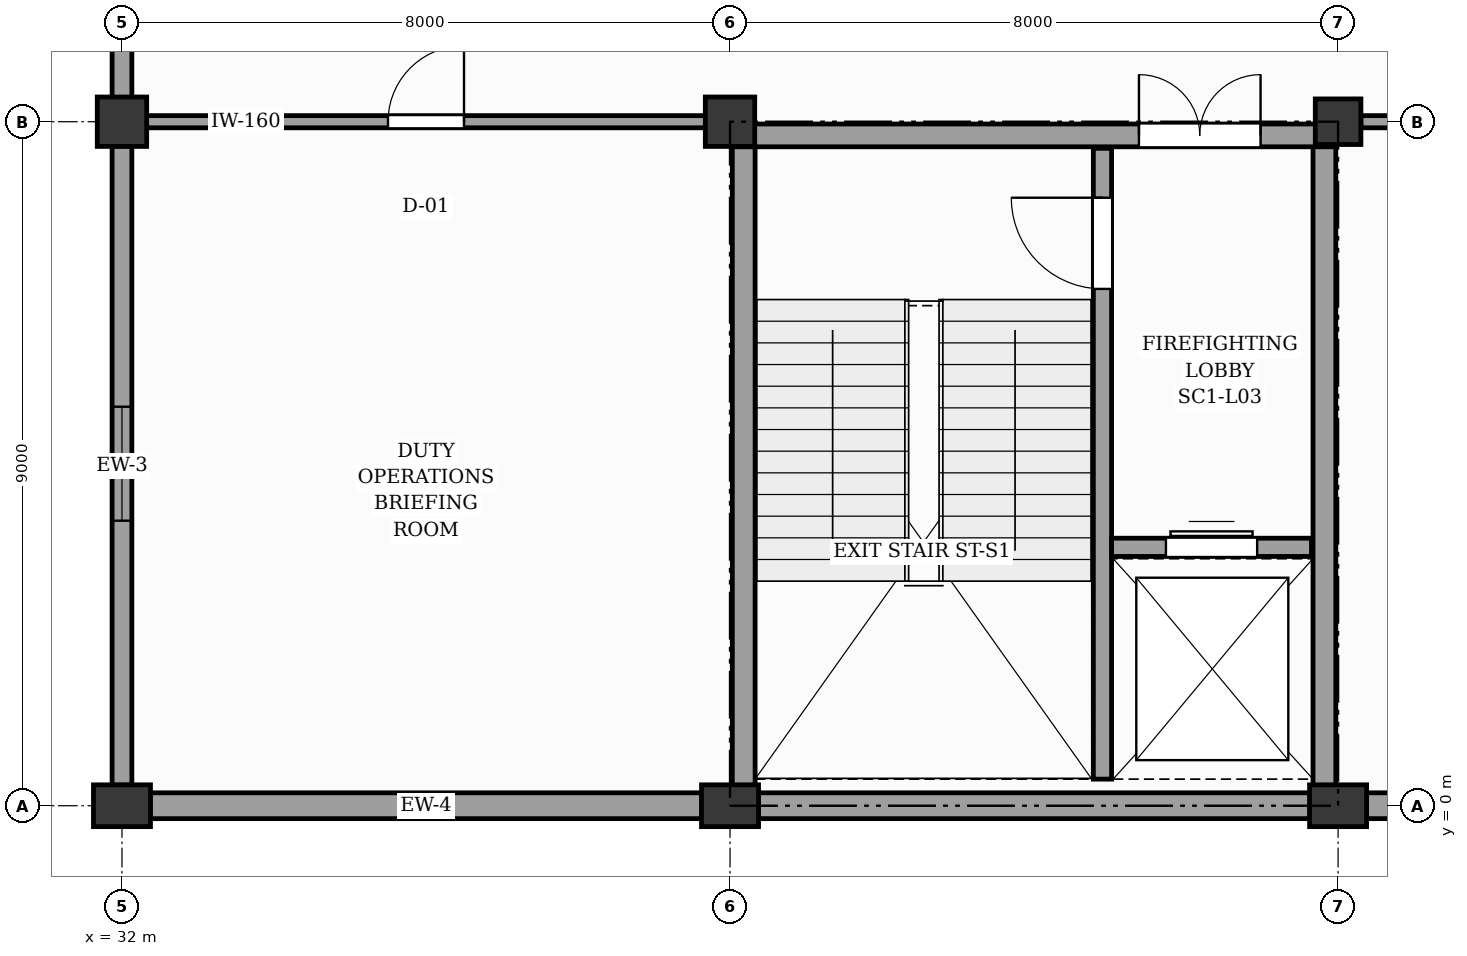
"""IFC4 building model, lengths in metres.
Left out: names, types, materials, properties, quantities, classifications, styles, units other than length and angle.
Written with IfcOpenShell. Run it as: python <this file> out.ifc"""

import sys

from ifc_helpers import new_model, si_unit, direction, frame, frame_2d, origin, origin_2d, place, context, subcontext, project, spatial, rectangle, extrude, element, fill, save


model = new_model("IFC4")
c1 = context("Model", 3, precision=1e-05, world=origin(), true_north=direction((0.0, 1.0)))
c2 = subcontext(c1, "Body", "Model", "MODEL_VIEW")
j1 = project(units=[si_unit("LENGTHUNIT", "METRE"), si_unit("PLANEANGLEUNIT", "RADIAN")], contexts=[c1])
p1 = place(None, origin())
s1 = spatial("IfcSite", under=j1, at=p1, CompositionType="ELEMENT")
p2 = place(p1, origin())
s2 = spatial("IfcBuilding", under=s1, at=p2, CompositionType="ELEMENT")
p3 = place(p2, frame((0.0, 0.0, 16.2)))
s3 = spatial("IfcBuildingStorey", under=s2, at=p3, CompositionType="ELEMENT", Elevation=16.2)
p4 = place(p3, frame((32.0, 0.0, 0.0), z_axis=(0.0, 0.0, 1.0), x_axis=(1.0, 0.0, 0.0)))
e1 = element("IfcColumn", 1, at=p4, inside=s3, PredefinedType="PILASTER", context=c2, shape_type="SweptSolid", body=[
    extrude(rectangle(XDim=0.75, YDim=0.55, at=origin_2d()), origin(), (0.0, 0.0, 1.0), 4.2),
])
p5 = place(p3, frame((32.0, 9.0, 0.0), z_axis=(0.0, 0.0, 1.0), x_axis=(1.0, 0.0, 0.0)))
e2 = element("IfcColumn", 2, at=p5, inside=s3, PredefinedType="COLUMN", context=c2, shape_type="SweptSolid", body=[
    extrude(rectangle(XDim=0.65, YDim=0.65, at=origin_2d()), origin(), (0.0, 0.0, 1.0), 4.2),
])
p6 = place(p3, frame((40.0, 0.0, 0.0), z_axis=(0.0, 0.0, 1.0), x_axis=(1.0, 0.0, 0.0)))
e3 = element("IfcColumn", 3, at=p6, inside=s3, PredefinedType="PILASTER", context=c2, shape_type="SweptSolid", body=[
    extrude(rectangle(XDim=0.75, YDim=0.55, at=origin_2d()), origin(), (0.0, 0.0, 1.0), 4.2),
])
p7 = place(p3, frame((40.0, 9.0, 0.0), z_axis=(0.0, 0.0, 1.0), x_axis=(1.0, 0.0, 0.0)))
e4 = element("IfcColumn", 4, at=p7, inside=s3, PredefinedType="COLUMN", context=c2, shape_type="SweptSolid", body=[
    extrude(rectangle(XDim=0.65, YDim=0.65, at=origin_2d()), origin(), (0.0, 0.0, 1.0), 4.2),
])
p8 = place(p3, frame((48.0, 0.0, 0.0), z_axis=(0.0, 0.0, 1.0), x_axis=(1.0, 0.0, 0.0)))
e5 = element("IfcColumn", 5, at=p8, inside=s3, PredefinedType="PILASTER", context=c2, shape_type="SweptSolid", body=[
    extrude(rectangle(XDim=0.75, YDim=0.55, at=origin_2d()), origin(), (0.0, 0.0, 1.0), 4.2),
])
p9 = place(p3, frame((48.0, 9.0, 0.0), z_axis=(0.0, 0.0, 1.0), x_axis=(1.0, 0.0, 0.0)))
e6 = element("IfcColumn", 6, at=p9, inside=s3, PredefinedType="COLUMN", context=c2, shape_type="SweptSolid", body=[
    extrude(rectangle(XDim=0.6, YDim=0.6, at=origin_2d()), origin(), (0.0, 0.0, 1.0), 4.2),
])
for number, where, z_axis, x_axis in (
    (7, (32.37, 0.0, 0.0), (0.0, 0.0, 1.0), (1.0, 0.0, 0.0)),
    (8, (40.37, 0.0, 0.0), (0.0, 0.0, 1.0), (1.0, 0.0, 0.0)),
    (9, (48.37, 0.0, 0.0), (0.0, 0.0, 1.0), (1.0, 0.0, 0.0)),
):
    element("IfcWall", number, at=place(p3, frame(where, z_axis=z_axis, x_axis=x_axis)), inside=s3, PredefinedType="SOLIDWALL", context=c2, shape_type="SweptSolid", body=[
        extrude(rectangle(XDim=7.26, YDim=0.34, at=frame_2d((3.63, 0.0))), origin(), (0.0, 0.0, 1.0), 3.24),
    ])
p10 = place(p3, frame((32.0, 0.27, 0.0), z_axis=(0.0, 0.0, 1.0), x_axis=(0.0, 1.0, 0.0)))
e10 = element("IfcWall", 10, at=p10, inside=s3, PredefinedType="SOLIDWALL", context=c2, shape_type="SweptSolid", body=[
    extrude(rectangle(XDim=8.41, YDim=0.26, at=frame_2d((4.205, 0.0))), origin(), (0.0, 0.0, 1.0), 3.13),
])
p11 = place(p10, frame((3.48, 0.0, 0.95)))
e11 = element("IfcOpeningElement", 11, at=p11, cuts=e10, PredefinedType="OPENING", context=c2, shape_type="SweptSolid", body=[
    extrude(rectangle(XDim=1.5, YDim=1.9, at=frame_2d((0.75, 0.95))), frame((0.0, 0.14, 0.0), z_axis=(0.0, -1.0, 0.0), x_axis=(1.0, 0.0, 0.0)), (0.0, 0.0, 1.0), 0.28),
])
p12 = place(p3, frame((32.0, 9.32, 0.0), z_axis=(0.0, 0.0, 1.0), x_axis=(0.0, 1.0, 0.0)))
e12 = element("IfcWall", 12, at=p12, inside=s3, PredefinedType="SOLIDWALL", context=c2, shape_type="SweptSolid", body=[
    extrude(rectangle(XDim=8.36, YDim=0.26, at=frame_2d((4.18, 0.0))), origin(), (0.0, 0.0, 1.0), 3.13),
])
p13 = place(p12, frame((3.43, 0.0, 0.95)))
e13 = element("IfcOpeningElement", 13, at=p13, cuts=e12, PredefinedType="OPENING", context=c2, shape_type="SweptSolid", body=[
    extrude(rectangle(XDim=1.5, YDim=1.9, at=frame_2d((0.75, 0.95))), frame((0.0, 0.14, 0.0), z_axis=(0.0, -1.0, 0.0), x_axis=(1.0, 0.0, 0.0)), (0.0, 0.0, 1.0), 0.28),
])
p14 = place(p3, frame((44.9, 0.35, 0.0), z_axis=(0.0, 0.0, 1.0), x_axis=(0.0, 1.0, 0.0)))
e14 = element("IfcWall", 14, at=p14, inside=s3, PredefinedType="SHEAR", context=c2, shape_type="SweptSolid", body=[
    extrude(rectangle(XDim=8.3, YDim=0.24, at=frame_2d((4.15, 0.0))), origin(), (0.0, 0.0, 1.0), 3.92),
])
p15 = place(p14, frame((6.45, 0.0, 0.0)))
e15 = element("IfcOpeningElement", 15, at=p15, cuts=e14, PredefinedType="OPENING", context=c2, shape_type="SweptSolid", body=[
    extrude(rectangle(XDim=1.2, YDim=2.15, at=frame_2d((0.6, 1.075))), frame((0.0, 0.13, 0.0), z_axis=(0.0, -1.0, 0.0), x_axis=(1.0, 0.0, 0.0)), (0.0, 0.0, 1.0), 0.26),
])
p16 = place(p3, frame((45.02, 3.4, 0.0), z_axis=(0.0, 0.0, 1.0), x_axis=(1.0, 0.0, 0.0)))
e16 = element("IfcWall", 16, at=p16, inside=s3, PredefinedType="SHEAR", context=c2, shape_type="SweptSolid", body=[
    extrude(rectangle(XDim=2.63, YDim=0.24, at=frame_2d((1.315, 0.0))), origin(), (0.0, 0.0, 1.0), 3.92),
])
p17 = place(p16, frame((0.715, 0.0, 0.0)))
e17 = element("IfcOpeningElement", 17, at=p17, cuts=e16, PredefinedType="OPENING", context=c2, shape_type="SweptSolid", body=[
    extrude(rectangle(XDim=1.2, YDim=2.15, at=frame_2d((0.6, 1.075))), frame((0.0, 0.13, 0.0), z_axis=(0.0, -1.0, 0.0), x_axis=(1.0, 0.0, 0.0)), (0.0, 0.0, 1.0), 0.26),
])
for number, where, z_axis, x_axis in (
    (18, (40.18, 0.18, 0.0), (0.0, 0.0, 1.0), (0.0, 1.0, 0.0)),
    (19, (47.82, 0.18, 0.0), (0.0, 0.0, 1.0), (0.0, 1.0, 0.0)),
):
    element("IfcWall", number, at=place(p3, frame(where, z_axis=z_axis, x_axis=x_axis)), inside=s3, PredefinedType="SHEAR", context=c2, shape_type="SweptSolid", body=[
        extrude(rectangle(XDim=8.64, YDim=0.3, at=frame_2d((4.32, 0.0))), origin(), (0.0, 0.0, 1.0), 3.92),
    ])
p18 = place(p3, frame((40.03, 8.82, 0.0), z_axis=(0.0, 0.0, 1.0), x_axis=(1.0, 0.0, 0.0)))
e20 = element("IfcWall", 20, at=p18, inside=s3, PredefinedType="SHEAR", context=c2, shape_type="SweptSolid", body=[
    extrude(rectangle(XDim=7.94, YDim=0.3, at=frame_2d((3.97, 0.0))), origin(), (0.0, 0.0, 1.0), 3.92),
])
p19 = place(p18, frame((5.35, 0.0, 0.0)))
e21 = element("IfcOpeningElement", 21, at=p19, cuts=e20, PredefinedType="OPENING", context=c2, shape_type="SweptSolid", body=[
    extrude(rectangle(XDim=1.6, YDim=2.15, at=frame_2d((0.8, 1.075))), frame((0.0, 0.16, 0.0), z_axis=(0.0, -1.0, 0.0), x_axis=(1.0, 0.0, 0.0)), (0.0, 0.0, 1.0), 0.32),
])
p20 = place(p3, frame((32.3, 9.0, 0.0), z_axis=(0.0, 0.0, 1.0), x_axis=(1.0, 0.0, 0.0)))
e22 = element("IfcWall", 22, at=p20, inside=s3, PredefinedType="PARTITIONING", context=c2, shape_type="SweptSolid", body=[
    extrude(rectangle(XDim=7.4, YDim=0.16, at=frame_2d((3.7, 0.0))), origin(), (0.0, 0.0, 1.0), 3.1),
])
p21 = place(p20, frame((3.2, 0.0, 0.0)))
e23 = element("IfcOpeningElement", 23, at=p21, cuts=e22, PredefinedType="OPENING", context=c2, shape_type="SweptSolid", body=[
    extrude(rectangle(XDim=1.0, YDim=2.1, at=frame_2d((0.5, 1.05))), frame((0.0, 0.09, 0.0), z_axis=(0.0, -1.0, 0.0), x_axis=(1.0, 0.0, 0.0)), (0.0, 0.0, 1.0), 0.18),
])
p22 = place(p3, frame((48.3, 9.0, 0.0), z_axis=(0.0, 0.0, 1.0), x_axis=(1.0, 0.0, 0.0)))
e24 = element("IfcWall", 24, at=p22, inside=s3, PredefinedType="PARTITIONING", context=c2, shape_type="SweptSolid", body=[
    extrude(rectangle(XDim=7.4, YDim=0.16, at=frame_2d((3.7, 0.0))), origin(), (0.0, 0.0, 1.0), 3.1),
])
p23 = place(p22, frame((3.2, 0.0, 0.0)))
e25 = element("IfcOpeningElement", 25, at=p23, cuts=e24, PredefinedType="OPENING", context=c2, shape_type="SweptSolid", body=[
    extrude(rectangle(XDim=1.0, YDim=2.1, at=frame_2d((0.5, 1.05))), frame((0.0, 0.09, 0.0), z_axis=(0.0, -1.0, 0.0), x_axis=(1.0, 0.0, 0.0)), (0.0, 0.0, 1.0), 0.18),
])
p24 = place(p11, origin())
e26 = element("IfcWindow", 26, at=p24, inside=s3, PartitioningType="SINGLE_PANEL", PredefinedType="WINDOW", context=c2, shape_type="SweptSolid", body=[
    extrude(rectangle(XDim=1.5, YDim=1.9, at=frame_2d((0.75, 0.95))), frame((0.0, 0.03, 0.0), z_axis=(0.0, -1.0, 0.0), x_axis=(1.0, 0.0, 0.0)), (0.0, 0.0, 1.0), 0.06),
])
fill(e11, e26)
p25 = place(p15, origin())
e27 = element("IfcDoor", 27, at=p25, inside=s3, OperationType="SINGLE_SWING_RIGHT", PredefinedType="DOOR", context=c2, shape_type="SweptSolid", body=[
    extrude(rectangle(XDim=1.2, YDim=2.15, at=frame_2d((0.6, 1.075))), frame((0.0, 0.025, 0.0), z_axis=(0.0, -1.0, 0.0), x_axis=(1.0, 0.0, 0.0)), (0.0, 0.0, 1.0), 0.05),
])
fill(e15, e27)
p26 = place(p17, origin())
e28 = element("IfcDoor", 28, at=p26, inside=s3, OperationType="DOUBLE_DOOR_SLIDING", PredefinedType="DOOR", context=c2, shape_type="SweptSolid", body=[
    extrude(rectangle(XDim=1.2, YDim=2.15, at=frame_2d((0.6, 1.075))), frame((0.0, 0.025, 0.0), z_axis=(0.0, -1.0, 0.0), x_axis=(1.0, 0.0, 0.0)), (0.0, 0.0, 1.0), 0.05),
])
fill(e17, e28)
p27 = place(p19, origin())
e29 = element("IfcDoor", 29, at=p27, inside=s3, OperationType="DOUBLE_DOOR_SINGLE_SWING", PredefinedType="DOOR", context=c2, shape_type="SweptSolid", body=[
    extrude(rectangle(XDim=1.6, YDim=2.15, at=frame_2d((0.8, 1.075))), frame((0.0, 0.025, 0.0), z_axis=(0.0, -1.0, 0.0), x_axis=(1.0, 0.0, 0.0)), (0.0, 0.0, 1.0), 0.05),
])
fill(e21, e29)
p28 = place(p21, origin())
e30 = element("IfcDoor", 30, at=p28, inside=s3, OperationType="SINGLE_SWING_RIGHT", PredefinedType="DOOR", context=c2, shape_type="SweptSolid", body=[
    extrude(rectangle(XDim=1.0, YDim=2.1, at=frame_2d((0.5, 1.05))), frame((0.0, 0.025, 0.0), z_axis=(0.0, -1.0, 0.0), x_axis=(1.0, 0.0, 0.0)), (0.0, 0.0, 1.0), 0.05),
])
fill(e23, e30)
save(model, sys.argv[1])
